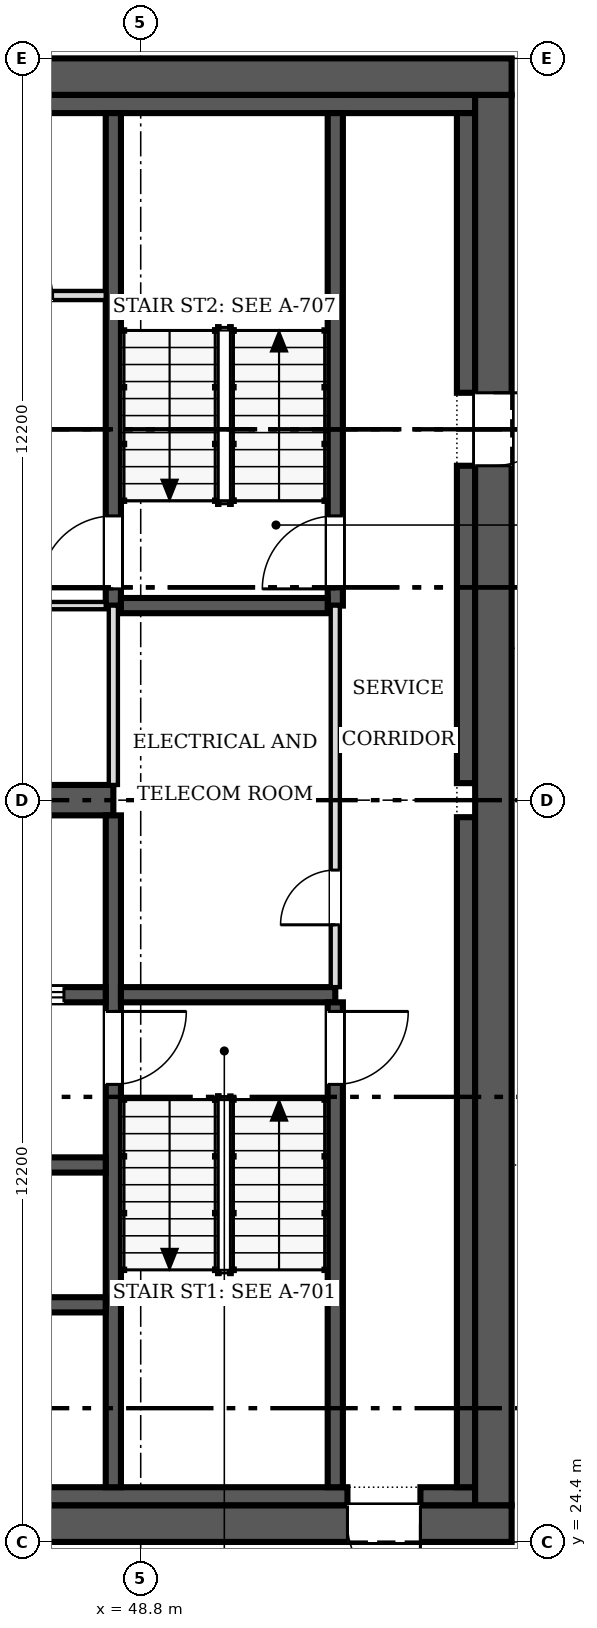
"""IFC4 building model, lengths in metres.
Left out: names, types, materials, properties, quantities, classifications, styles, units other than length and angle.
Written with IfcOpenShell. Run it as: python <this file> out.ifc"""

import sys

from ifc_helpers import new_model, si_unit, direction, frame, frame_2d, origin, place, context, subcontext, project, spatial, rectangle, extrude, source, transform, mapped, element, fill, save


model = new_model("IFC4")
c1 = context("Model", 3, precision=1e-05, world=origin(), true_north=direction((0.0, 1.0)))
c2 = subcontext(c1, "Body", "Model", "MODEL_VIEW")
j1 = project(units=[si_unit("LENGTHUNIT", "METRE"), si_unit("PLANEANGLEUNIT", "RADIAN")], contexts=[c1])
p1 = place(None, origin())
s1 = spatial("IfcSite", under=j1, at=p1, CompositionType="ELEMENT")
p2 = place(p1, origin())
s2 = spatial("IfcBuilding", under=s1, at=p2, CompositionType="ELEMENT")
p3 = place(p2, frame((0.0, 0.0, 185.8)))
s3 = spatial("IfcBuildingStorey", under=s2, at=p3, CompositionType="ELEMENT", Elevation=185.8)
p4 = place(p3, frame((54.9, 24.7, 0.0), z_axis=(0.0, 0.0, 1.0), x_axis=(-1.0, 0.0, 0.0)))
e1 = element("IfcWall", 1, at=p4, inside=s3, PredefinedType="SHEAR", context=c2, shape_type="SweptSolid", body=[
    extrude(rectangle(XDim=24.4, YDim=0.6, at=frame_2d((12.2, 0.0))), origin(), (0.0, 0.0, 1.0), 3.8),
])
m1 = source(origin(), c2, "Body", "SweptSolid", [
    extrude(rectangle(XDim=1.2, YDim=2.1, at=frame_2d((0.6, 1.05))), frame((0.0, 0.31, 0.0), z_axis=(0.0, -1.0, 0.0), x_axis=(1.0, 0.0, 0.0)), (0.0, 0.0, 1.0), 0.62),
])
p5 = place(p4, frame((1.5, 0.0, 0.0)))
e2 = element("IfcOpeningElement", 2, at=p5, cuts=e1, PredefinedType="OPENING", context=c2, shape_type="MappedRepresentation", body=[
    mapped(m1, transform((0.0, 0.0, 0.0), scale=1.0)),
])
p6 = place(p3, frame((30.5, 48.5, 0.0), z_axis=(0.0, 0.0, 1.0), x_axis=(1.0, 0.0, 0.0)))
e3 = element("IfcWall", 3, at=p6, inside=s3, PredefinedType="SHEAR", context=c2, shape_type="SweptSolid", body=[
    extrude(rectangle(XDim=24.4, YDim=0.6, at=frame_2d((12.2, 0.0))), origin(), (0.0, 0.0, 1.0), 3.8),
])
p7 = place(p3, frame((54.6, 48.2, 0.0), z_axis=(0.0, 0.0, 1.0), x_axis=(0.0, -1.0, 0.0)))
e4 = element("IfcWall", 4, at=p7, inside=s3, PredefinedType="SHEAR", context=c2, shape_type="SweptSolid", body=[
    extrude(rectangle(XDim=23.2, YDim=0.6, at=frame_2d((11.6, 0.0))), origin(), (0.0, 0.0, 1.0), 3.8),
])
p8 = place(p7, frame((4.9, 0.0, 0.0)))
e5 = element("IfcOpeningElement", 5, at=p8, cuts=e4, PredefinedType="OPENING", context=c2, shape_type="MappedRepresentation", body=[
    mapped(m1, transform((0.0, 0.0, 0.0), scale=1.0)),
])
p9 = place(p3, frame((31.1, 25.15, 0.0), z_axis=(0.0, 0.0, 1.0), x_axis=(1.0, 0.0, 0.0)))
e6 = element("IfcWall", 6, at=p9, inside=s3, PredefinedType="SOLIDWALL", context=c2, shape_type="SweptSolid", body=[
    extrude(rectangle(XDim=21.1, YDim=0.3, at=frame_2d((10.55, 0.0))), origin(), (0.0, 0.0, 1.0), 3.8),
])
p10 = place(p3, frame((53.4, 25.15, 0.0), z_axis=(0.0, 0.0, 1.0), x_axis=(1.0, 0.0, 0.0)))
e7 = element("IfcWall", 7, at=p10, inside=s3, PredefinedType="SOLIDWALL", context=c2, shape_type="SweptSolid", body=[
    extrude(rectangle(XDim=0.9, YDim=0.3, at=frame_2d((0.45, 0.0))), origin(), (0.0, 0.0, 1.0), 3.8),
])
p11 = place(p3, frame((31.1, 48.05, 0.0), z_axis=(0.0, 0.0, 1.0), x_axis=(1.0, 0.0, 0.0)))
e8 = element("IfcWall", 8, at=p11, inside=s3, PredefinedType="SOLIDWALL", context=c2, shape_type="SweptSolid", body=[
    extrude(rectangle(XDim=23.2, YDim=0.3, at=frame_2d((11.6, 0.0))), origin(), (0.0, 0.0, 1.0), 3.8),
])
p12 = place(p3, frame((54.15, 25.3, 0.0), z_axis=(0.0, 0.0, 1.0), x_axis=(0.0, 1.0, 0.0)))
e9 = element("IfcWall", 9, at=p12, inside=s3, PredefinedType="SOLIDWALL", context=c2, shape_type="SweptSolid", body=[
    extrude(rectangle(XDim=11.02, YDim=0.3, at=frame_2d((5.51, 0.0))), origin(), (0.0, 0.0, 1.0), 3.8),
])
p13 = place(p3, frame((54.15, 36.88, 0.0), z_axis=(0.0, 0.0, 1.0), x_axis=(0.0, 1.0, 0.0)))
e10 = element("IfcWall", 10, at=p13, inside=s3, PredefinedType="SOLIDWALL", context=c2, shape_type="SweptSolid", body=[
    extrude(rectangle(XDim=5.22, YDim=0.3, at=frame_2d((2.61, 0.0))), origin(), (0.0, 0.0, 1.0), 3.8),
])
p14 = place(p3, frame((54.15, 43.3, 0.0), z_axis=(0.0, 0.0, 1.0), x_axis=(0.0, 1.0, 0.0)))
e11 = element("IfcWall", 11, at=p14, inside=s3, PredefinedType="SOLIDWALL", context=c2, shape_type="SweptSolid", body=[
    extrude(rectangle(XDim=4.6, YDim=0.3, at=frame_2d((2.3, 0.0))), origin(), (0.0, 0.0, 1.0), 3.8),
])
p15 = place(p3, frame((31.4, 36.6, 0.0), z_axis=(0.0, 0.0, 1.0), x_axis=(1.0, 0.0, 0.0)))
e12 = element("IfcWall", 12, at=p15, inside=s3, PredefinedType="SHEAR", context=c2, shape_type="SweptSolid", body=[
    extrude(rectangle(XDim=16.95, YDim=0.5, at=frame_2d((8.475, 0.0))), origin(), (0.0, 0.0, 1.0), 3.8),
])
p16 = place(p3, frame((48.35, 36.35, 0.0), z_axis=(0.0, 0.0, 1.0), x_axis=(0.0, -1.0, 0.0)))
e13 = element("IfcWall", 13, at=p16, inside=s3, PredefinedType="SOLIDWALL", context=c2, shape_type="SweptSolid", body=[
    extrude(rectangle(XDim=11.05, YDim=0.25, at=frame_2d((5.525, 0.0))), origin(), (0.0, 0.0, 1.0), 3.8),
])
m2 = source(origin(), c2, "Body", "SweptSolid", [
    extrude(rectangle(XDim=1.2, YDim=2.1, at=frame_2d((0.6, 1.05))), frame((0.0, 0.135, 0.0), z_axis=(0.0, -1.0, 0.0), x_axis=(1.0, 0.0, 0.0)), (0.0, 0.0, 1.0), 0.27),
])
p17 = place(p16, frame((3.225, 0.0, 0.0)))
e14 = element("IfcOpeningElement", 14, at=p17, cuts=e13, PredefinedType="OPENING", context=c2, shape_type="MappedRepresentation", body=[
    mapped(m2, transform((0.0, 0.0, 0.0), scale=1.0)),
])
p18 = place(p3, frame((48.225, 33.4, 0.0), z_axis=(0.0, 0.0, 1.0), x_axis=(-1.0, 0.0, 0.0)))
e15 = element("IfcWall", 15, at=p18, inside=s3, PredefinedType="SOLIDWALL", context=c2, shape_type="SweptSolid", body=[
    extrude(rectangle(XDim=5.275, YDim=0.25, at=frame_2d((2.638, 0.0))), origin(), (0.0, 0.0, 1.0), 3.8),
])
p19 = place(p18, frame((3.512, 0.0, 0.0)))
e16 = element("IfcOpeningElement", 16, at=p19, cuts=e15, PredefinedType="OPENING", context=c2, shape_type="MappedRepresentation", body=[
    mapped(m2, transform((0.0, 0.0, 0.0), scale=1.0)),
])
p20 = place(p18, frame((0.688, 0.0, 0.0)))
e17 = element("IfcOpeningElement", 17, at=p20, cuts=e15, PredefinedType="OPENING", context=c2, shape_type="MappedRepresentation", body=[
    mapped(m2, transform((0.0, 0.0, 0.0), scale=1.0)),
])
p21 = place(p3, frame((48.475, 33.4, 0.0), z_axis=(0.0, 0.0, 1.0), x_axis=(1.0, 0.0, 0.0)))
e18 = element("IfcWall", 18, at=p21, inside=s3, PredefinedType="SOLIDWALL", context=c2, shape_type="SweptSolid", body=[
    extrude(rectangle(XDim=3.525, YDim=0.25, at=frame_2d((1.762, 0.0))), origin(), (0.0, 0.0, 1.0), 3.8),
])
p22 = place(p3, frame((48.35, 47.9, 0.0), z_axis=(0.0, 0.0, 1.0), x_axis=(0.0, -1.0, 0.0)))
e19 = element("IfcWall", 19, at=p22, inside=s3, PredefinedType="SOLIDWALL", context=c2, shape_type="SweptSolid", body=[
    extrude(rectangle(XDim=8.1, YDim=0.25, at=frame_2d((4.05, 0.0))), origin(), (0.0, 0.0, 1.0), 3.8),
])
p23 = place(p22, frame((6.625, 0.0, 0.0)))
e20 = element("IfcOpeningElement", 20, at=p23, cuts=e19, PredefinedType="OPENING", context=c2, shape_type="MappedRepresentation", body=[
    mapped(m2, transform((0.0, 0.0, 0.0), scale=1.0)),
])
p24 = place(p3, frame((52.0, 25.3, 0.0), z_axis=(0.0, 0.0, 1.0), x_axis=(0.0, 1.0, 0.0)))
e21 = element("IfcWall", 21, at=p24, inside=s3, PredefinedType="SOLIDWALL", context=c2, shape_type="SweptSolid", body=[
    extrude(rectangle(XDim=7.975, YDim=0.25, at=frame_2d((3.987, 0.0))), origin(), (0.0, 0.0, 1.0), 3.8),
])
p25 = place(p24, frame((6.625, 0.0, 0.0)))
e22 = element("IfcOpeningElement", 22, at=p25, cuts=e21, PredefinedType="OPENING", context=c2, shape_type="MappedRepresentation", body=[
    mapped(m2, transform((0.0, 0.0, 0.0), scale=1.0)),
])
p26 = place(p3, frame((52.0, 39.8, 0.0), z_axis=(0.0, 0.0, 1.0), x_axis=(0.0, 1.0, 0.0)))
e23 = element("IfcWall", 23, at=p26, inside=s3, PredefinedType="SOLIDWALL", context=c2, shape_type="SweptSolid", body=[
    extrude(rectangle(XDim=8.1, YDim=0.25, at=frame_2d((4.05, 0.0))), origin(), (0.0, 0.0, 1.0), 3.8),
])
p27 = place(p26, frame((0.275, 0.0, 0.0)))
e24 = element("IfcOpeningElement", 24, at=p27, cuts=e23, PredefinedType="OPENING", context=c2, shape_type="MappedRepresentation", body=[
    mapped(m2, transform((0.0, 0.0, 0.0), scale=1.0)),
])
for number, where, z_axis, x_axis in (
    (25, (42.95, 28.3, 0.0), (0.0, 0.0, 1.0), (1.0, 0.0, 0.0)),
    (26, (42.95, 30.6, 0.0), (0.0, 0.0, 1.0), (1.0, 0.0, 0.0)),
):
    element("IfcWall", number, at=place(p3, frame(where, z_axis=z_axis, x_axis=x_axis)), inside=s3, PredefinedType="SOLIDWALL", context=c2, shape_type="SweptSolid", body=[
        extrude(rectangle(XDim=5.275, YDim=0.25, at=frame_2d((2.638, 0.0))), origin(), (0.0, 0.0, 1.0), 3.8),
    ])
p28 = place(p3, frame((48.475, 39.8, 0.0), z_axis=(0.0, 0.0, 1.0), x_axis=(1.0, 0.0, 0.0)))
e27 = element("IfcWall", 27, at=p28, inside=s3, PredefinedType="SOLIDWALL", context=c2, shape_type="SweptSolid", body=[
    extrude(rectangle(XDim=3.4, YDim=0.25, at=frame_2d((1.7, 0.0))), origin(), (0.0, 0.0, 1.0), 3.8),
])
p29 = place(p3, frame((52.0, 33.525, 0.0), z_axis=(0.0, 0.0, 1.0), x_axis=(0.0, 1.0, 0.0)))
e28 = element("IfcWall", 28, at=p29, inside=s3, PredefinedType="PARTITIONING", context=c2, shape_type="SweptSolid", body=[
    extrude(rectangle(XDim=6.275, YDim=0.15, at=frame_2d((3.138, 0.0))), origin(), (0.0, 0.0, 1.0), 3.6),
])
m3 = source(origin(), c2, "Body", "SweptSolid", [
    extrude(rectangle(XDim=0.9, YDim=2.1, at=frame_2d((0.45, 1.05))), frame((0.0, 0.085, 0.0), z_axis=(0.0, -1.0, 0.0), x_axis=(1.0, 0.0, 0.0)), (0.0, 0.0, 1.0), 0.17),
])
p30 = place(p29, frame((1.025, 0.0, 0.0)))
e29 = element("IfcOpeningElement", 29, at=p30, cuts=e28, PredefinedType="OPENING", context=c2, shape_type="MappedRepresentation", body=[
    mapped(m3, transform((0.0, 0.0, 0.0), scale=1.0)),
])
p31 = place(p3, frame((48.225, 39.8, 0.0), z_axis=(0.0, 0.0, 1.0), x_axis=(-1.0, 0.0, 0.0)))
e30 = element("IfcWall", 30, at=p31, inside=s3, PredefinedType="PARTITIONING", context=c2, shape_type="SweptSolid", body=[
    extrude(rectangle(XDim=5.275, YDim=0.12, at=frame_2d((2.638, 0.0))), origin(), (0.0, 0.0, 1.0), 3.6),
])
m4 = source(origin(), c2, "Body", "SweptSolid", [
    extrude(rectangle(XDim=0.9, YDim=2.1, at=frame_2d((0.45, 1.05))), frame((0.0, 0.07, 0.0), z_axis=(0.0, -1.0, 0.0), x_axis=(1.0, 0.0, 0.0)), (0.0, 0.0, 1.0), 0.14),
])
p32 = place(p31, frame((2.25, 0.0, 0.0)))
e31 = element("IfcOpeningElement", 31, at=p32, cuts=e30, PredefinedType="OPENING", context=c2, shape_type="MappedRepresentation", body=[
    mapped(m4, transform((0.0, 0.0, 0.0), scale=1.0)),
])
p33 = place(p3, frame((48.35, 36.85, 0.0), z_axis=(0.0, 0.0, 1.0), x_axis=(0.0, 1.0, 0.0)))
e32 = element("IfcWall", 32, at=p33, inside=s3, PredefinedType="PARTITIONING", context=c2, shape_type="SweptSolid", body=[
    extrude(rectangle(XDim=2.95, YDim=0.15, at=frame_2d((1.475, 0.0))), origin(), (0.0, 0.0, 1.0), 3.6),
])
p34 = place(p3, frame((45.6, 44.9, 0.0), z_axis=(0.0, 0.0, 1.0), x_axis=(1.0, 0.0, 0.0)))
e33 = element("IfcWall", 33, at=p34, inside=s3, PredefinedType="PARTITIONING", context=c2, shape_type="SweptSolid", body=[
    extrude(rectangle(XDim=2.625, YDim=0.15, at=frame_2d((1.312, 0.0))), origin(), (0.0, 0.0, 1.0), 3.6),
])
p35 = place(p34, frame((0.85, 0.0, 0.0)))
e34 = element("IfcOpeningElement", 34, at=p35, cuts=e33, PredefinedType="OPENING", context=c2, shape_type="MappedRepresentation", body=[
    mapped(m3, transform((0.0, 0.0, 0.0), scale=1.0)),
])
m5 = source(origin(), c2, "Body", "SweptSolid", [
    extrude(rectangle(XDim=1.2, YDim=2.1, at=frame_2d((0.6, 1.05))), frame((0.0, 0.025, 0.0), z_axis=(0.0, -1.0, 0.0), x_axis=(1.0, 0.0, 0.0)), (0.0, 0.0, 1.0), 0.05),
])
p36 = place(p5, origin())
e35 = element("IfcDoor", 35, at=p36, inside=s3, OperationType="SINGLE_SWING_LEFT", PredefinedType="DOOR", context=c2, shape_type="MappedRepresentation", body=[
    mapped(m5, transform((0.0, 0.0, 0.0), scale=1.0)),
])
fill(e2, e35)
p37 = place(p8, origin())
e36 = element("IfcDoor", 36, at=p37, inside=s3, OperationType="SINGLE_SWING_LEFT", PredefinedType="DOOR", context=c2, shape_type="MappedRepresentation", body=[
    mapped(m5, transform((0.0, 0.0, 0.0), scale=1.0)),
])
fill(e5, e36)
p38 = place(p17, origin())
e37 = element("IfcDoor", 37, at=p38, inside=s3, OperationType="SINGLE_SWING_LEFT", PredefinedType="DOOR", context=c2, shape_type="MappedRepresentation", body=[
    mapped(m5, transform((0.0, 0.0, 0.0), scale=1.0)),
])
fill(e14, e37)
p39 = place(p20, origin())
e38 = element("IfcDoor", 38, at=p39, inside=s3, OperationType="DOUBLE_DOOR_SLIDING", PredefinedType="DOOR", context=c2, shape_type="MappedRepresentation", body=[
    mapped(m5, transform((0.0, 0.0, 0.0), scale=1.0)),
])
fill(e17, e38)
p40 = place(p23, origin())
e39 = element("IfcDoor", 39, at=p40, inside=s3, OperationType="SINGLE_SWING_RIGHT", PredefinedType="DOOR", context=c2, shape_type="MappedRepresentation", body=[
    mapped(m5, transform((0.0, 0.0, 0.0), scale=1.0)),
])
fill(e20, e39)
p41 = place(p25, origin())
e40 = element("IfcDoor", 40, at=p41, inside=s3, OperationType="SINGLE_SWING_RIGHT", PredefinedType="DOOR", context=c2, shape_type="MappedRepresentation", body=[
    mapped(m5, transform((0.0, 0.0, 0.0), scale=1.0)),
])
fill(e22, e40)
p42 = place(p27, origin())
e41 = element("IfcDoor", 41, at=p42, inside=s3, OperationType="SINGLE_SWING_LEFT", PredefinedType="DOOR", context=c2, shape_type="MappedRepresentation", body=[
    mapped(m5, transform((0.0, 0.0, 0.0), scale=1.0)),
])
fill(e24, e41)
m6 = source(origin(), c2, "Body", "SweptSolid", [
    extrude(rectangle(XDim=0.9, YDim=2.1, at=frame_2d((0.45, 1.05))), frame((0.0, 0.025, 0.0), z_axis=(0.0, -1.0, 0.0), x_axis=(1.0, 0.0, 0.0)), (0.0, 0.0, 1.0), 0.05),
])
p43 = place(p30, origin())
e42 = element("IfcDoor", 42, at=p43, inside=s3, OperationType="SINGLE_SWING_LEFT", PredefinedType="DOOR", context=c2, shape_type="MappedRepresentation", body=[
    mapped(m6, transform((0.0, 0.0, 0.0), scale=1.0)),
])
fill(e29, e42)
save(model, sys.argv[1])
